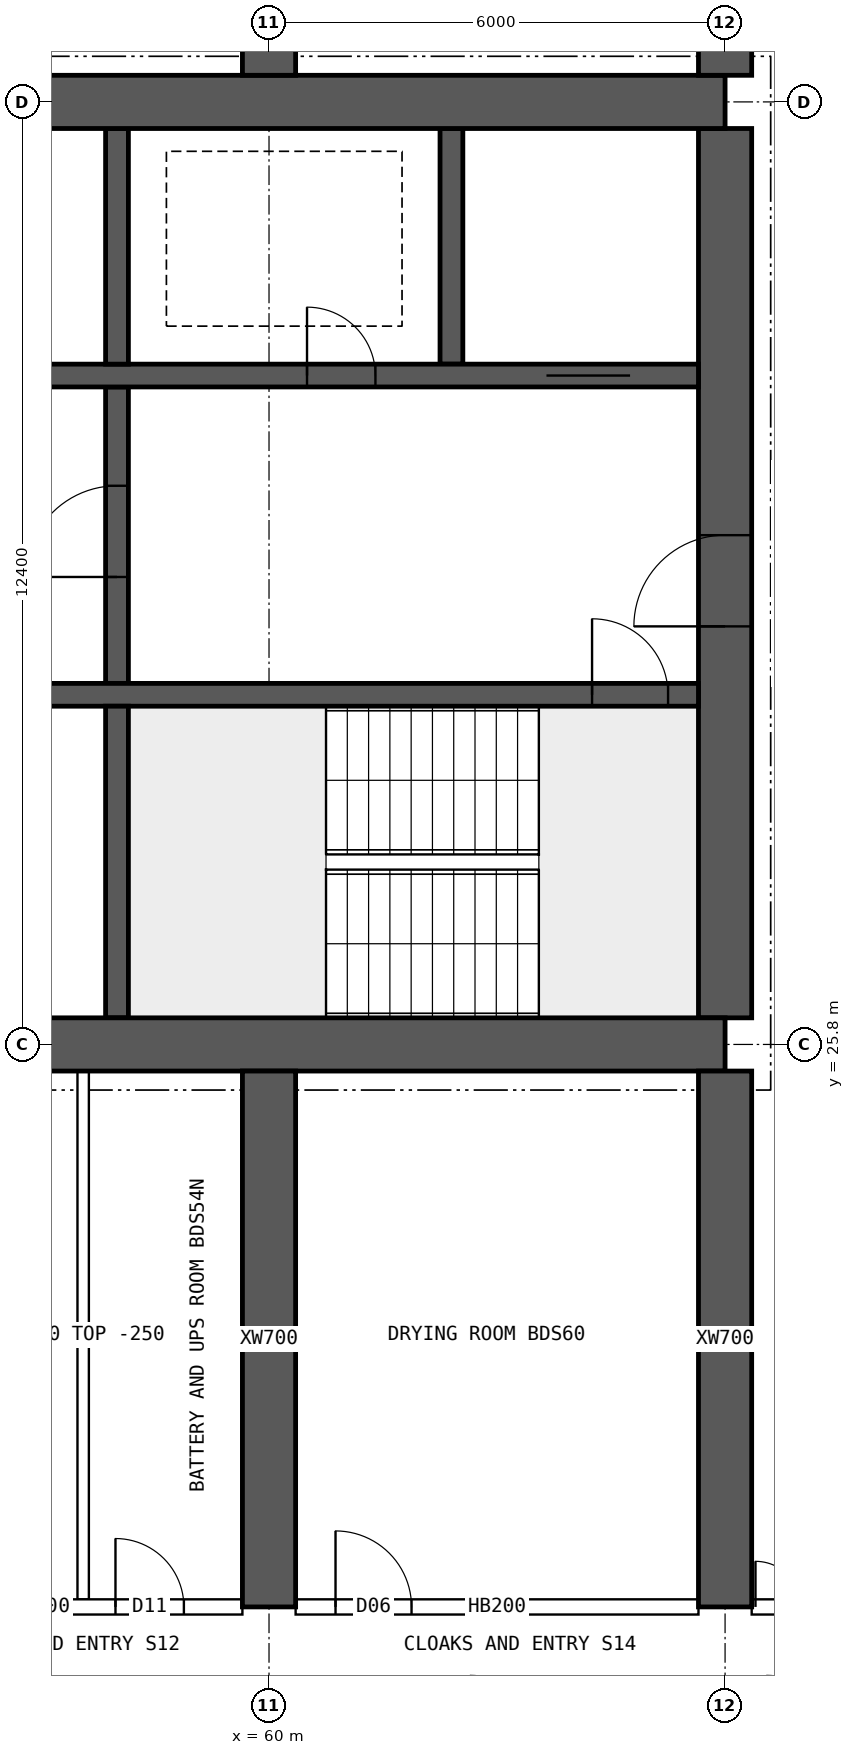
"""IFC4 building model, lengths in metres.
Left out: names, types, materials, properties, quantities, classifications, styles, units other than length and angle.
Written with IfcOpenShell. Run it as: python <this file> out.ifc"""

import sys

from ifc_helpers import new_model, si_unit, direction, frame, frame_2d, origin, place, context, subcontext, project, spatial, rectangle, extrude, element, fill, save


model = new_model("IFC4")
c1 = context("Model", 3, precision=1e-05, world=origin(), true_north=direction((0.0, 1.0)))
c2 = subcontext(c1, "Body", "Model", "MODEL_VIEW")
j1 = project(units=[si_unit("LENGTHUNIT", "METRE"), si_unit("PLANEANGLEUNIT", "RADIAN")], contexts=[c1])
p1 = place(None, origin())
s1 = spatial("IfcSite", under=j1, at=p1, CompositionType="ELEMENT")
p2 = place(p1, origin())
s2 = spatial("IfcBuilding", under=s1, at=p2, CompositionType="ELEMENT")
p3 = place(p2, frame((0.0, 0.0, 246.55)))
s3 = spatial("IfcBuildingStorey", under=s2, at=p3, CompositionType="ELEMENT", Elevation=246.55)
for number, where, z_axis, x_axis in (
    (1, (18.0, 25.8, 0.0), (0.0, 0.0, 1.0), (1.0, 0.0, 0.0)),
    (2, (18.0, 38.2, 0.0), (0.0, 0.0, 1.0), (1.0, 0.0, 0.0)),
):
    element("IfcWall", number, at=place(p3, frame(where, z_axis=z_axis, x_axis=x_axis)), inside=s3, PredefinedType="SHEAR", context=c2, shape_type="SweptSolid", body=[
        extrude(rectangle(XDim=48.0, YDim=0.7, at=frame_2d((24.0, 0.0))), origin(), (0.0, 0.0, 1.0), 3.75),
    ])
p4 = place(p3, frame((66.0, 26.15, 0.0), z_axis=(0.0, 0.0, 1.0), x_axis=(0.0, 1.0, 0.0)))
e3 = element("IfcWall", 3, at=p4, inside=s3, PredefinedType="SHEAR", context=c2, shape_type="SweptSolid", body=[
    extrude(rectangle(XDim=11.7, YDim=0.7, at=frame_2d((5.85, 0.0))), origin(), (0.0, 0.0, 1.0), 3.75),
])
p5 = place(p4, frame((5.15, 0.0, 0.0)))
e4 = element("IfcOpeningElement", 4, at=p5, cuts=e3, PredefinedType="OPENING", context=c2, shape_type="SweptSolid", body=[
    extrude(rectangle(XDim=1.2, YDim=2.1, at=frame_2d((0.6, 1.05))), frame((0.0, 0.36, 0.0), z_axis=(0.0, -1.0, 0.0), x_axis=(1.0, 0.0, 0.0)), (0.0, 0.0, 1.0), 0.72),
])
p6 = place(p3, frame((18.35, 30.4, 0.0), z_axis=(0.0, 0.0, 1.0), x_axis=(1.0, 0.0, 0.0)))
e5 = element("IfcWall", 5, at=p6, inside=s3, PredefinedType="SHEAR", context=c2, shape_type="SweptSolid", body=[
    extrude(rectangle(XDim=47.3, YDim=0.3, at=frame_2d((23.65, 0.0))), origin(), (0.0, 0.0, 1.0), 3.75),
])
p7 = place(p6, frame((0.4, 0.0, 0.0)))
e6 = element("IfcOpeningElement", 6, at=p7, cuts=e5, PredefinedType="OPENING", context=c2, shape_type="SweptSolid", body=[
    extrude(rectangle(XDim=1.0, YDim=2.1, at=frame_2d((0.5, 1.05))), frame((0.0, 0.16, 0.0), z_axis=(0.0, -1.0, 0.0), x_axis=(1.0, 0.0, 0.0)), (0.0, 0.0, 1.0), 0.32),
])
p8 = place(p6, frame((45.9, 0.0, 0.0)))
e7 = element("IfcOpeningElement", 7, at=p8, cuts=e5, PredefinedType="OPENING", context=c2, shape_type="SweptSolid", body=[
    extrude(rectangle(XDim=1.0, YDim=2.1, at=frame_2d((0.5, 1.05))), frame((0.0, 0.16, 0.0), z_axis=(0.0, -1.0, 0.0), x_axis=(1.0, 0.0, 0.0)), (0.0, 0.0, 1.0), 0.32),
])
p9 = place(p6, frame((8.4, 0.0, 0.0)))
e8 = element("IfcOpeningElement", 8, at=p9, cuts=e5, PredefinedType="OPENING", context=c2, shape_type="SweptSolid", body=[
    extrude(rectangle(XDim=1.1, YDim=2.1, at=frame_2d((0.55, 1.05))), frame((0.0, 0.16, 0.0), z_axis=(0.0, -1.0, 0.0), x_axis=(1.0, 0.0, 0.0)), (0.0, 0.0, 1.0), 0.32),
])
p10 = place(p6, frame((11.0, 0.0, 0.0)))
e9 = element("IfcOpeningElement", 9, at=p10, cuts=e5, PredefinedType="OPENING", context=c2, shape_type="SweptSolid", body=[
    extrude(rectangle(XDim=1.1, YDim=2.1, at=frame_2d((0.55, 1.05))), frame((0.0, 0.16, 0.0), z_axis=(0.0, -1.0, 0.0), x_axis=(1.0, 0.0, 0.0)), (0.0, 0.0, 1.0), 0.32),
])
p11 = place(p6, frame((13.6, 0.0, 0.0)))
e10 = element("IfcOpeningElement", 10, at=p11, cuts=e5, PredefinedType="OPENING", context=c2, shape_type="SweptSolid", body=[
    extrude(rectangle(XDim=1.1, YDim=2.1, at=frame_2d((0.55, 1.05))), frame((0.0, 0.16, 0.0), z_axis=(0.0, -1.0, 0.0), x_axis=(1.0, 0.0, 0.0)), (0.0, 0.0, 1.0), 0.32),
])
p12 = place(p6, frame((16.2, 0.0, 0.0)))
e11 = element("IfcOpeningElement", 11, at=p12, cuts=e5, PredefinedType="OPENING", context=c2, shape_type="SweptSolid", body=[
    extrude(rectangle(XDim=1.1, YDim=2.1, at=frame_2d((0.55, 1.05))), frame((0.0, 0.16, 0.0), z_axis=(0.0, -1.0, 0.0), x_axis=(1.0, 0.0, 0.0)), (0.0, 0.0, 1.0), 0.32),
])
p13 = place(p6, frame((18.975, 0.0, 0.0)))
e12 = element("IfcOpeningElement", 12, at=p13, cuts=e5, PredefinedType="OPENING", context=c2, shape_type="SweptSolid", body=[
    extrude(rectangle(XDim=0.9, YDim=2.1, at=frame_2d((0.45, 1.05))), frame((0.0, 0.16, 0.0), z_axis=(0.0, -1.0, 0.0), x_axis=(1.0, 0.0, 0.0)), (0.0, 0.0, 1.0), 0.32),
])
p14 = place(p6, frame((24.475, 0.0, 0.0)))
e13 = element("IfcOpeningElement", 13, at=p14, cuts=e5, PredefinedType="OPENING", context=c2, shape_type="SweptSolid", body=[
    extrude(rectangle(XDim=0.9, YDim=2.1, at=frame_2d((0.45, 1.05))), frame((0.0, 0.16, 0.0), z_axis=(0.0, -1.0, 0.0), x_axis=(1.0, 0.0, 0.0)), (0.0, 0.0, 1.0), 0.32),
])
p15 = place(p6, frame((30.267, 0.0, 0.0)))
e14 = element("IfcOpeningElement", 14, at=p15, cuts=e5, PredefinedType="OPENING", context=c2, shape_type="SweptSolid", body=[
    extrude(rectangle(XDim=1.1, YDim=2.1, at=frame_2d((0.55, 1.05))), frame((0.0, 0.16, 0.0), z_axis=(0.0, -1.0, 0.0), x_axis=(1.0, 0.0, 0.0)), (0.0, 0.0, 1.0), 0.32),
])
p16 = place(p6, frame((33.8, 0.0, 0.0)))
e15 = element("IfcOpeningElement", 15, at=p16, cuts=e5, PredefinedType="OPENING", context=c2, shape_type="SweptSolid", body=[
    extrude(rectangle(XDim=1.1, YDim=2.1, at=frame_2d((0.55, 1.05))), frame((0.0, 0.16, 0.0), z_axis=(0.0, -1.0, 0.0), x_axis=(1.0, 0.0, 0.0)), (0.0, 0.0, 1.0), 0.32),
])
p17 = place(p6, frame((37.333, 0.0, 0.0)))
e16 = element("IfcOpeningElement", 16, at=p17, cuts=e5, PredefinedType="OPENING", context=c2, shape_type="SweptSolid", body=[
    extrude(rectangle(XDim=1.1, YDim=2.1, at=frame_2d((0.55, 1.05))), frame((0.0, 0.16, 0.0), z_axis=(0.0, -1.0, 0.0), x_axis=(1.0, 0.0, 0.0)), (0.0, 0.0, 1.0), 0.32),
])
p18 = place(p3, frame((18.35, 34.6, 0.0), z_axis=(0.0, 0.0, 1.0), x_axis=(1.0, 0.0, 0.0)))
e17 = element("IfcWall", 17, at=p18, inside=s3, PredefinedType="SHEAR", context=c2, shape_type="SweptSolid", body=[
    extrude(rectangle(XDim=47.3, YDim=0.3, at=frame_2d((23.65, 0.0))), origin(), (0.0, 0.0, 1.0), 3.75),
])
p19 = place(p18, frame((0.9, 0.0, 0.0)))
e18 = element("IfcOpeningElement", 18, at=p19, cuts=e17, PredefinedType="OPENING", context=c2, shape_type="SweptSolid", body=[
    extrude(rectangle(XDim=1.1, YDim=2.1, at=frame_2d((0.55, 1.05))), frame((0.0, 0.16, 0.0), z_axis=(0.0, -1.0, 0.0), x_axis=(1.0, 0.0, 0.0)), (0.0, 0.0, 1.0), 0.32),
])
p20 = place(p18, frame((45.3, 0.0, 0.0)))
e19 = element("IfcOpeningElement", 19, at=p20, cuts=e17, PredefinedType="OPENING", context=c2, shape_type="SweptSolid", body=[
    extrude(rectangle(XDim=1.1, YDim=2.1, at=frame_2d((0.55, 1.05))), frame((0.0, 0.16, 0.0), z_axis=(0.0, -1.0, 0.0), x_axis=(1.0, 0.0, 0.0)), (0.0, 0.0, 1.0), 0.32),
])
p21 = place(p18, frame((4.25, 0.0, 0.0)))
e20 = element("IfcOpeningElement", 20, at=p21, cuts=e17, PredefinedType="OPENING", context=c2, shape_type="SweptSolid", body=[
    extrude(rectangle(XDim=0.9, YDim=2.1, at=frame_2d((0.45, 1.05))), frame((0.0, 0.16, 0.0), z_axis=(0.0, -1.0, 0.0), x_axis=(1.0, 0.0, 0.0)), (0.0, 0.0, 1.0), 0.32),
])
p22 = place(p18, frame((42.15, 0.0, 0.0)))
e21 = element("IfcOpeningElement", 21, at=p22, cuts=e17, PredefinedType="OPENING", context=c2, shape_type="SweptSolid", body=[
    extrude(rectangle(XDim=0.9, YDim=2.1, at=frame_2d((0.45, 1.05))), frame((0.0, 0.16, 0.0), z_axis=(0.0, -1.0, 0.0), x_axis=(1.0, 0.0, 0.0)), (0.0, 0.0, 1.0), 0.32),
])
p23 = place(p18, frame((9.025, 0.0, 0.0)))
e22 = element("IfcOpeningElement", 22, at=p23, cuts=e17, PredefinedType="OPENING", context=c2, shape_type="SweptSolid", body=[
    extrude(rectangle(XDim=0.9, YDim=2.1, at=frame_2d((0.45, 1.05))), frame((0.0, 0.16, 0.0), z_axis=(0.0, -1.0, 0.0), x_axis=(1.0, 0.0, 0.0)), (0.0, 0.0, 1.0), 0.32),
])
p24 = place(p18, frame((12.999, 0.0, 0.0)))
e23 = element("IfcOpeningElement", 23, at=p24, cuts=e17, PredefinedType="OPENING", context=c2, shape_type="SweptSolid", body=[
    extrude(rectangle(XDim=0.9, YDim=2.1, at=frame_2d((0.45, 1.05))), frame((0.0, 0.16, 0.0), z_axis=(0.0, -1.0, 0.0), x_axis=(1.0, 0.0, 0.0)), (0.0, 0.0, 1.0), 0.32),
])
p25 = place(p18, frame((16.646, 0.0, 0.0)))
e24 = element("IfcOpeningElement", 24, at=p25, cuts=e17, PredefinedType="OPENING", context=c2, shape_type="SweptSolid", body=[
    extrude(rectangle(XDim=0.9, YDim=2.1, at=frame_2d((0.45, 1.05))), frame((0.0, 0.16, 0.0), z_axis=(0.0, -1.0, 0.0), x_axis=(1.0, 0.0, 0.0)), (0.0, 0.0, 1.0), 0.32),
])
p26 = place(p18, frame((20.405, 0.0, 0.0)))
e25 = element("IfcOpeningElement", 25, at=p26, cuts=e17, PredefinedType="OPENING", context=c2, shape_type="SweptSolid", body=[
    extrude(rectangle(XDim=0.9, YDim=2.1, at=frame_2d((0.45, 1.05))), frame((0.0, 0.16, 0.0), z_axis=(0.0, -1.0, 0.0), x_axis=(1.0, 0.0, 0.0)), (0.0, 0.0, 1.0), 0.32),
])
p27 = place(p18, frame((24.811, 0.0, 0.0)))
e26 = element("IfcOpeningElement", 26, at=p27, cuts=e17, PredefinedType="OPENING", context=c2, shape_type="SweptSolid", body=[
    extrude(rectangle(XDim=0.9, YDim=2.1, at=frame_2d((0.45, 1.05))), frame((0.0, 0.16, 0.0), z_axis=(0.0, -1.0, 0.0), x_axis=(1.0, 0.0, 0.0)), (0.0, 0.0, 1.0), 0.32),
])
p28 = place(p18, frame((27.608, 0.0, 0.0)))
e27 = element("IfcOpeningElement", 27, at=p28, cuts=e17, PredefinedType="OPENING", context=c2, shape_type="SweptSolid", body=[
    extrude(rectangle(XDim=0.9, YDim=2.1, at=frame_2d((0.45, 1.05))), frame((0.0, 0.16, 0.0), z_axis=(0.0, -1.0, 0.0), x_axis=(1.0, 0.0, 0.0)), (0.0, 0.0, 1.0), 0.32),
])
p29 = place(p18, frame((29.778, 0.0, 0.0)))
e28 = element("IfcOpeningElement", 28, at=p29, cuts=e17, PredefinedType="OPENING", context=c2, shape_type="SweptSolid", body=[
    extrude(rectangle(XDim=0.9, YDim=2.1, at=frame_2d((0.45, 1.05))), frame((0.0, 0.16, 0.0), z_axis=(0.0, -1.0, 0.0), x_axis=(1.0, 0.0, 0.0)), (0.0, 0.0, 1.0), 0.32),
])
p30 = place(p18, frame((33.577, 0.0, 0.0)))
e29 = element("IfcOpeningElement", 29, at=p30, cuts=e17, PredefinedType="OPENING", context=c2, shape_type="SweptSolid", body=[
    extrude(rectangle(XDim=0.9, YDim=2.1, at=frame_2d((0.45, 1.05))), frame((0.0, 0.16, 0.0), z_axis=(0.0, -1.0, 0.0), x_axis=(1.0, 0.0, 0.0)), (0.0, 0.0, 1.0), 0.32),
])
p31 = place(p18, frame((37.528, 0.0, 0.0)))
e30 = element("IfcOpeningElement", 30, at=p31, cuts=e17, PredefinedType="OPENING", context=c2, shape_type="SweptSolid", body=[
    extrude(rectangle(XDim=0.9, YDim=2.1, at=frame_2d((0.45, 1.05))), frame((0.0, 0.16, 0.0), z_axis=(0.0, -1.0, 0.0), x_axis=(1.0, 0.0, 0.0)), (0.0, 0.0, 1.0), 0.32),
])
p32 = place(p3, frame((58.0, 26.15, 0.0), z_axis=(0.0, 0.0, 1.0), x_axis=(0.0, 1.0, 0.0)))
e31 = element("IfcWall", 31, at=p32, inside=s3, PredefinedType="SHEAR", context=c2, shape_type="SweptSolid", body=[
    extrude(rectangle(XDim=4.1, YDim=0.3, at=frame_2d((2.05, 0.0))), origin(), (0.0, 0.0, 1.0), 3.75),
])
p33 = place(p3, frame((58.0, 30.55, 0.0), z_axis=(0.0, 0.0, 1.0), x_axis=(0.0, 1.0, 0.0)))
e32 = element("IfcWall", 32, at=p33, inside=s3, PredefinedType="SHEAR", context=c2, shape_type="SweptSolid", body=[
    extrude(rectangle(XDim=3.9, YDim=0.3, at=frame_2d((1.95, 0.0))), origin(), (0.0, 0.0, 1.0), 3.75),
])
p34 = place(p33, frame((1.4, 0.0, 0.0)))
e33 = element("IfcOpeningElement", 33, at=p34, cuts=e32, PredefinedType="OPENING", context=c2, shape_type="SweptSolid", body=[
    extrude(rectangle(XDim=1.2, YDim=2.1, at=frame_2d((0.6, 1.05))), frame((0.0, 0.16, 0.0), z_axis=(0.0, -1.0, 0.0), x_axis=(1.0, 0.0, 0.0)), (0.0, 0.0, 1.0), 0.32),
])
for number, where, z_axis, x_axis in (
    (34, (62.4, 34.75, 0.0), (0.0, 0.0, 1.0), (0.0, 1.0, 0.0)),
    (35, (58.0, 34.75, 0.0), (0.0, 0.0, 1.0), (0.0, 1.0, 0.0)),
):
    element("IfcWall", number, at=place(p3, frame(where, z_axis=z_axis, x_axis=x_axis)), inside=s3, PredefinedType="SHEAR", context=c2, shape_type="SweptSolid", body=[
        extrude(rectangle(XDim=3.1, YDim=0.3, at=frame_2d((1.55, 0.0))), origin(), (0.0, 0.0, 1.0), 3.75),
    ])
for number, where, z_axis, x_axis in (
    (36, (60.0, 18.4, 0.0), (0.0, 0.0, 1.0), (0.0, 1.0, 0.0)),
    (37, (60.0, 38.55, 0.0), (0.0, 0.0, 1.0), (0.0, 1.0, 0.0)),
    (38, (66.0, 18.4, 0.0), (0.0, 0.0, 1.0), (0.0, 1.0, 0.0)),
    (39, (66.0, 38.55, 0.0), (0.0, 0.0, 1.0), (0.0, 1.0, 0.0)),
):
    element("IfcWall", number, at=place(p3, frame(where, z_axis=z_axis, x_axis=x_axis)), inside=s3, PredefinedType="SHEAR", context=c2, shape_type="SweptSolid", body=[
        extrude(rectangle(XDim=7.05, YDim=0.7, at=frame_2d((3.525, 0.0))), origin(), (0.0, 0.0, 1.0), 3.75),
    ])
p35 = place(p3, frame((54.35, 18.4, 0.0), z_axis=(0.0, 0.0, 1.0), x_axis=(1.0, 0.0, 0.0)))
e40 = element("IfcWall", 40, at=p35, inside=s3, PredefinedType="SOLIDWALL", context=c2, shape_type="SweptSolid", body=[
    extrude(rectangle(XDim=5.3, YDim=0.2, at=frame_2d((2.65, 0.0))), origin(), (0.0, 0.0, 1.0), 3.5),
])
p36 = place(p35, frame((0.35, 0.0, 0.0)))
e41 = element("IfcOpeningElement", 41, at=p36, cuts=e40, PredefinedType="OPENING", context=c2, shape_type="SweptSolid", body=[
    extrude(rectangle(XDim=0.9, YDim=2.1, at=frame_2d((0.45, 1.05))), frame((0.0, 0.11, 0.0), z_axis=(0.0, -1.0, 0.0), x_axis=(1.0, 0.0, 0.0)), (0.0, 0.0, 1.0), 0.22),
])
p37 = place(p35, frame((3.63, 0.0, 0.0)))
e42 = element("IfcOpeningElement", 42, at=p37, cuts=e40, PredefinedType="OPENING", context=c2, shape_type="SweptSolid", body=[
    extrude(rectangle(XDim=0.9, YDim=2.1, at=frame_2d((0.45, 1.05))), frame((0.0, 0.11, 0.0), z_axis=(0.0, -1.0, 0.0), x_axis=(1.0, 0.0, 0.0)), (0.0, 0.0, 1.0), 0.22),
])
p38 = place(p3, frame((60.35, 18.4, 0.0), z_axis=(0.0, 0.0, 1.0), x_axis=(1.0, 0.0, 0.0)))
e43 = element("IfcWall", 43, at=p38, inside=s3, PredefinedType="SOLIDWALL", context=c2, shape_type="SweptSolid", body=[
    extrude(rectangle(XDim=5.3, YDim=0.2, at=frame_2d((2.65, 0.0))), origin(), (0.0, 0.0, 1.0), 3.5),
])
p39 = place(p38, frame((0.525, 0.0, 0.0)))
e44 = element("IfcOpeningElement", 44, at=p39, cuts=e43, PredefinedType="OPENING", context=c2, shape_type="SweptSolid", body=[
    extrude(rectangle(XDim=1.0, YDim=2.1, at=frame_2d((0.5, 1.05))), frame((0.0, 0.11, 0.0), z_axis=(0.0, -1.0, 0.0), x_axis=(1.0, 0.0, 0.0)), (0.0, 0.0, 1.0), 0.22),
])
p40 = place(p3, frame((66.35, 18.4, 0.0), z_axis=(0.0, 0.0, 1.0), x_axis=(1.0, 0.0, 0.0)))
e45 = element("IfcWall", 45, at=p40, inside=s3, PredefinedType="SOLIDWALL", context=c2, shape_type="SweptSolid", body=[
    extrude(rectangle(XDim=2.05, YDim=0.2, at=frame_2d((1.025, 0.0))), origin(), (0.0, 0.0, 1.0), 3.5),
])
p41 = place(p40, frame((0.05, 0.0, 0.0)))
e46 = element("IfcOpeningElement", 46, at=p41, cuts=e45, PredefinedType="OPENING", context=c2, shape_type="SweptSolid", body=[
    extrude(rectangle(XDim=1.2, YDim=2.1, at=frame_2d((0.6, 1.05))), frame((0.0, 0.11, 0.0), z_axis=(0.0, -1.0, 0.0), x_axis=(1.0, 0.0, 0.0)), (0.0, 0.0, 1.0), 0.22),
])
p42 = place(p3, frame((57.555, 18.5, 0.0), z_axis=(0.0, 0.0, 1.0), x_axis=(0.0, 1.0, 0.0)))
e47 = element("IfcWall", 47, at=p42, inside=s3, PredefinedType="PARTITIONING", context=c2, shape_type="SweptSolid", body=[
    extrude(rectangle(XDim=6.95, YDim=0.15, at=frame_2d((3.475, 0.0))), origin(), (0.0, 0.0, 1.0), 3.5),
])
p43 = place(p5, origin())
e48 = element("IfcDoor", 48, at=p43, inside=s3, OperationType="SINGLE_SWING_LEFT", PredefinedType="DOOR", context=c2, shape_type="SweptSolid", body=[
    extrude(rectangle(XDim=1.2, YDim=2.1, at=frame_2d((0.6, 1.05))), frame((0.0, 0.025, 0.0), z_axis=(0.0, -1.0, 0.0), x_axis=(1.0, 0.0, 0.0)), (0.0, 0.0, 1.0), 0.05),
])
fill(e4, e48)
p44 = place(p8, origin())
e49 = element("IfcDoor", 49, at=p44, inside=s3, OperationType="SINGLE_SWING_LEFT", PredefinedType="DOOR", context=c2, shape_type="SweptSolid", body=[
    extrude(rectangle(XDim=1.0, YDim=2.1, at=frame_2d((0.5, 1.05))), frame((0.0, 0.025, 0.0), z_axis=(0.0, -1.0, 0.0), x_axis=(1.0, 0.0, 0.0)), (0.0, 0.0, 1.0), 0.05),
])
fill(e7, e49)
p45 = place(p20, origin())
e50 = element("IfcDoor", 50, at=p45, inside=s3, OperationType="DOUBLE_DOOR_SLIDING", PredefinedType="DOOR", context=c2, shape_type="SweptSolid", body=[
    extrude(rectangle(XDim=1.1, YDim=2.1, at=frame_2d((0.55, 1.05))), frame((0.0, 0.025, 0.0), z_axis=(0.0, -1.0, 0.0), x_axis=(1.0, 0.0, 0.0)), (0.0, 0.0, 1.0), 0.05),
])
fill(e19, e50)
p46 = place(p22, origin())
e51 = element("IfcDoor", 51, at=p46, inside=s3, OperationType="SINGLE_SWING_LEFT", PredefinedType="DOOR", context=c2, shape_type="SweptSolid", body=[
    extrude(rectangle(XDim=0.9, YDim=2.1, at=frame_2d((0.45, 1.05))), frame((0.0, 0.025, 0.0), z_axis=(0.0, -1.0, 0.0), x_axis=(1.0, 0.0, 0.0)), (0.0, 0.0, 1.0), 0.05),
])
fill(e21, e51)
p47 = place(p34, origin())
e52 = element("IfcDoor", 52, at=p47, inside=s3, OperationType="SINGLE_SWING_LEFT", PredefinedType="DOOR", context=c2, shape_type="SweptSolid", body=[
    extrude(rectangle(XDim=1.2, YDim=2.1, at=frame_2d((0.6, 1.05))), frame((0.0, 0.025, 0.0), z_axis=(0.0, -1.0, 0.0), x_axis=(1.0, 0.0, 0.0)), (0.0, 0.0, 1.0), 0.05),
])
fill(e33, e52)
p48 = place(p41, origin())
e53 = element("IfcDoor", 53, at=p48, inside=s3, OperationType="DOUBLE_DOOR_SINGLE_SWING", PredefinedType="DOOR", context=c2, shape_type="SweptSolid", body=[
    extrude(rectangle(XDim=1.2, YDim=2.1, at=frame_2d((0.6, 1.05))), frame((0.0, 0.025, 0.0), z_axis=(0.0, -1.0, 0.0), x_axis=(1.0, 0.0, 0.0)), (0.0, 0.0, 1.0), 0.05),
])
fill(e46, e53)
p49 = place(p37, origin())
e54 = element("IfcDoor", 54, at=p49, inside=s3, OperationType="SINGLE_SWING_LEFT", PredefinedType="DOOR", context=c2, shape_type="SweptSolid", body=[
    extrude(rectangle(XDim=0.9, YDim=2.1, at=frame_2d((0.45, 1.05))), frame((0.0, 0.025, 0.0), z_axis=(0.0, -1.0, 0.0), x_axis=(1.0, 0.0, 0.0)), (0.0, 0.0, 1.0), 0.05),
])
fill(e42, e54)
p50 = place(p39, origin())
e55 = element("IfcDoor", 55, at=p50, inside=s3, OperationType="SINGLE_SWING_LEFT", PredefinedType="DOOR", context=c2, shape_type="SweptSolid", body=[
    extrude(rectangle(XDim=1.0, YDim=2.1, at=frame_2d((0.5, 1.05))), frame((0.0, 0.025, 0.0), z_axis=(0.0, -1.0, 0.0), x_axis=(1.0, 0.0, 0.0)), (0.0, 0.0, 1.0), 0.05),
])
fill(e44, e55)
save(model, sys.argv[1])
